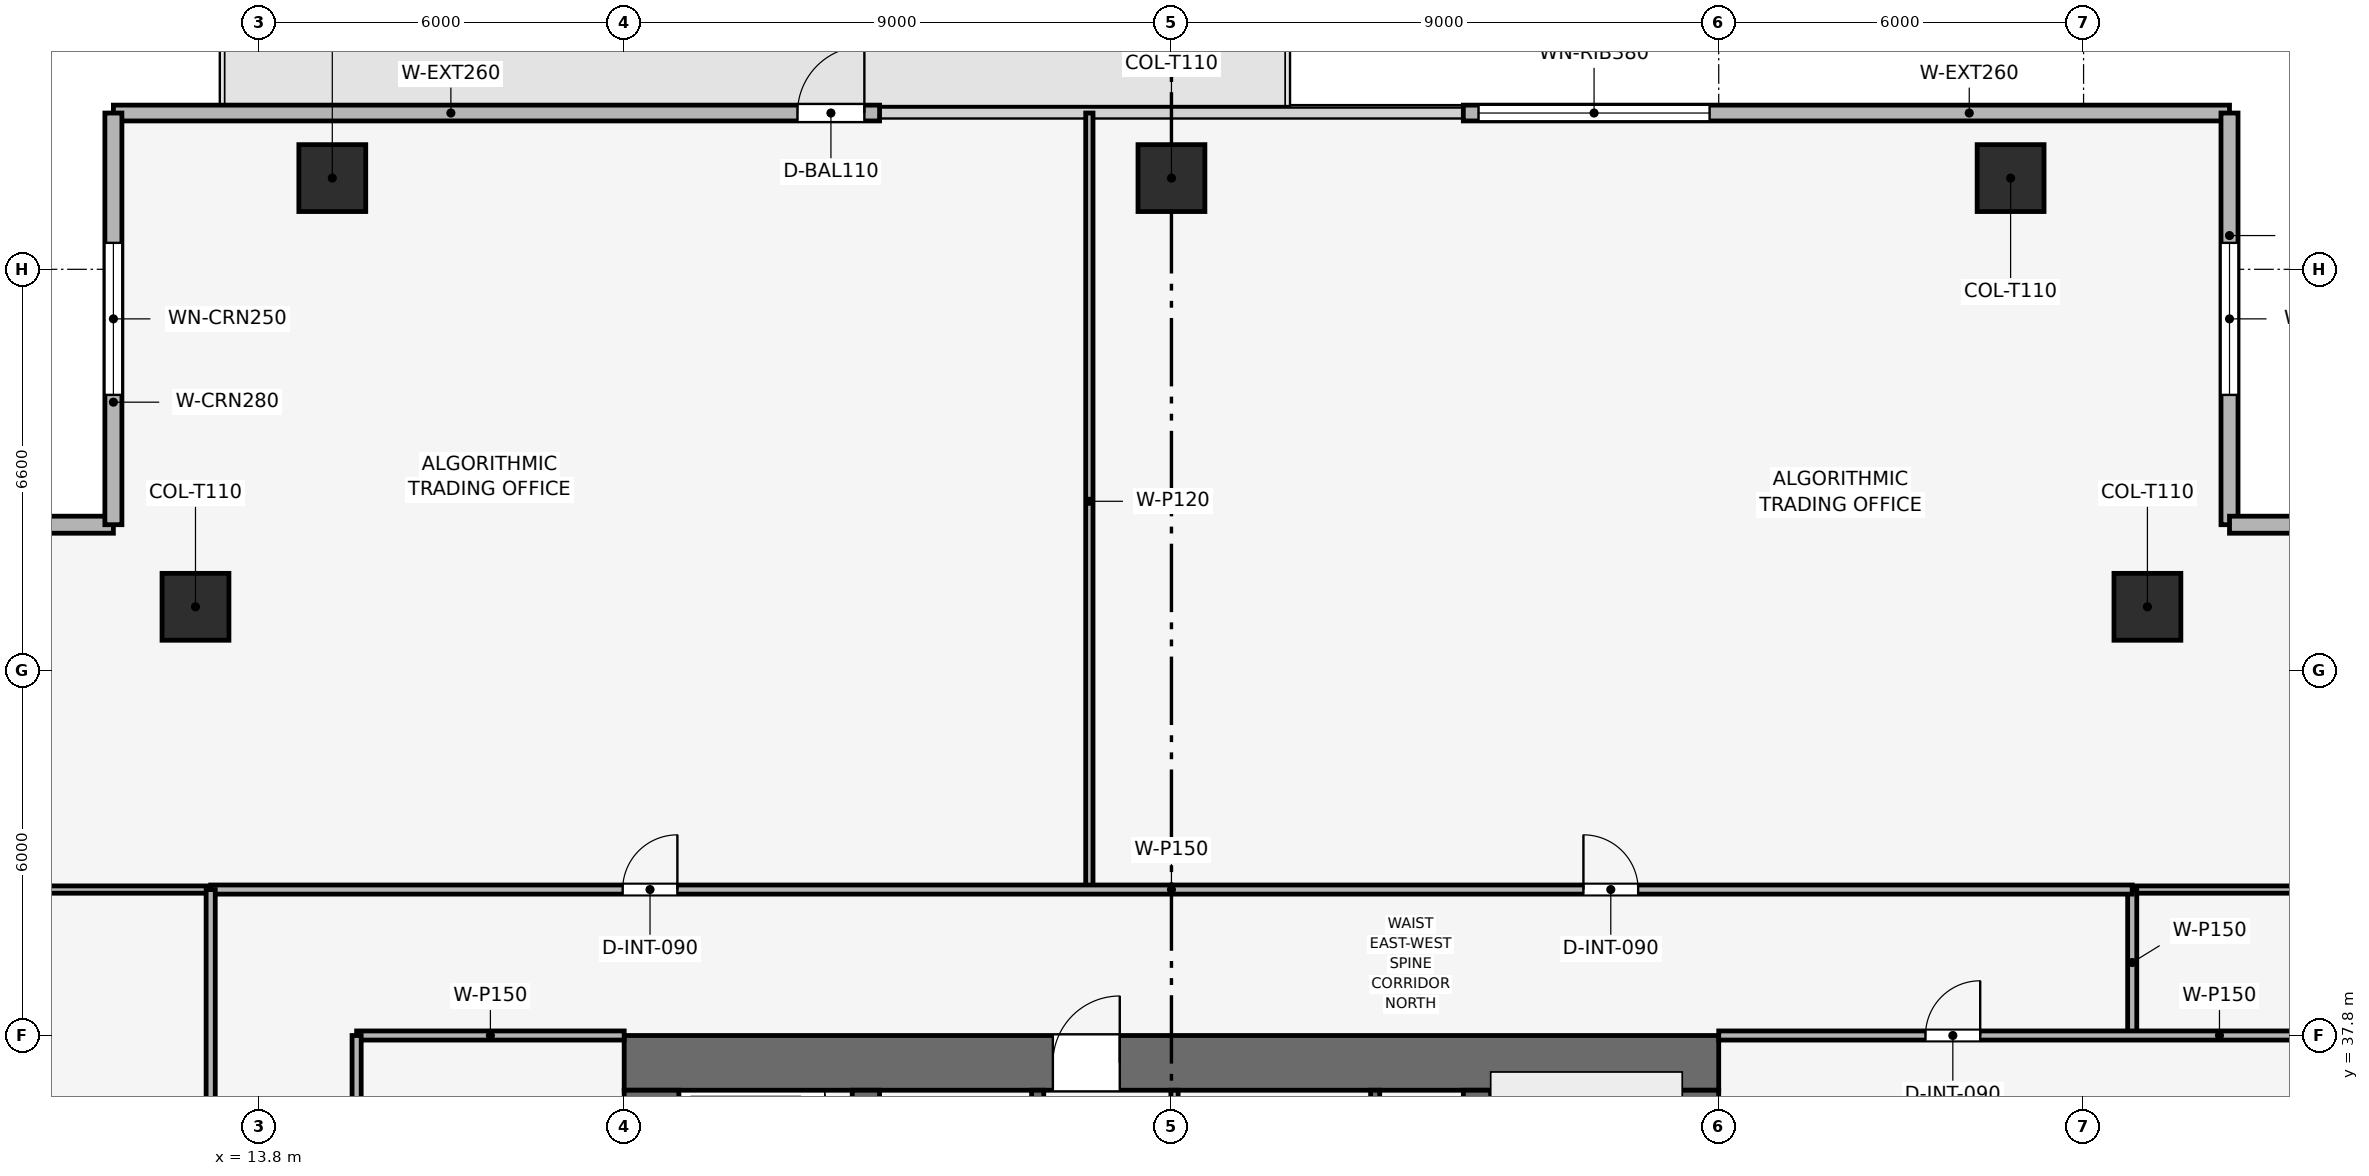
"""IFC4 building model, lengths in metres.
Left out: names, types, materials, properties, quantities, classifications, styles, units other than length and angle.
Written with IfcOpenShell. Run it as: python <this file> out.ifc"""

import sys

from ifc_helpers import new_model, si_unit, direction, frame, frame_2d, origin, origin_2d, place, context, subcontext, project, spatial, rectangle, extrude, element, fill, save


model = new_model("IFC4")
c1 = context("Model", 3, precision=1e-05, world=origin(), true_north=direction((0.0, 1.0)))
c2 = subcontext(c1, "Body", "Model", "MODEL_VIEW")
j1 = project(units=[si_unit("LENGTHUNIT", "METRE"), si_unit("PLANEANGLEUNIT", "RADIAN")], contexts=[c1])
p1 = place(None, origin())
s1 = spatial("IfcSite", under=j1, at=p1, CompositionType="ELEMENT")
p2 = place(p1, origin())
s2 = spatial("IfcBuilding", under=s1, at=p2, CompositionType="ELEMENT")
p3 = place(p2, frame((0.0, 0.0, 175.8)))
s3 = spatial("IfcBuildingStorey", under=s2, at=p3, CompositionType="ELEMENT", Elevation=175.8)
p4 = place(p3, frame((19.8, 37.35, 0.0), z_axis=(0.0, 0.0, 1.0), x_axis=(1.0, 0.0, 0.0)))
e1 = element("IfcWall", 1, at=p4, inside=s3, PredefinedType="SHEAR", context=c2, shape_type="SweptSolid", body=[
    extrude(rectangle(XDim=18.0, YDim=0.9, at=frame_2d((9.0, 0.0))), origin(), (0.0, 0.0, 1.0), 3.75),
])
p5 = place(p4, frame((7.05, 0.0, 0.0)))
e2 = element("IfcOpeningElement", 2, at=p5, cuts=e1, PredefinedType="OPENING", context=c2, shape_type="SweptSolid", body=[
    extrude(rectangle(XDim=1.1, YDim=2.15, at=frame_2d((0.55, 1.075))), frame((0.0, 0.46, 0.0), z_axis=(0.0, -1.0, 0.0), x_axis=(1.0, 0.0, 0.0)), (0.0, 0.0, 1.0), 0.92),
])
p6 = place(p3, frame((20.25, 20.7, 0.0), z_axis=(0.0, 0.0, 1.0), x_axis=(0.0, 1.0, 0.0)))
e3 = element("IfcWall", 3, at=p6, inside=s3, PredefinedType="SHEAR", context=c2, shape_type="SweptSolid", body=[
    extrude(rectangle(XDim=16.2, YDim=0.9, at=frame_2d((8.1, 0.0))), origin(), (0.0, 0.0, 1.0), 3.75),
])
p7 = place(p6, frame((10.1, 0.0, 0.0)))
e4 = element("IfcOpeningElement", 4, at=p7, cuts=e3, PredefinedType="OPENING", context=c2, shape_type="SweptSolid", body=[
    extrude(rectangle(XDim=1.1, YDim=2.15, at=frame_2d((0.55, 1.075))), frame((0.0, 0.46, 0.0), z_axis=(0.0, -1.0, 0.0), x_axis=(1.0, 0.0, 0.0)), (0.0, 0.0, 1.0), 0.92),
])
p8 = place(p3, frame((37.35, 20.7, 0.0), z_axis=(0.0, 0.0, 1.0), x_axis=(0.0, 1.0, 0.0)))
e5 = element("IfcWall", 5, at=p8, inside=s3, PredefinedType="SHEAR", context=c2, shape_type="SweptSolid", body=[
    extrude(rectangle(XDim=16.2, YDim=0.9, at=frame_2d((8.1, 0.0))), origin(), (0.0, 0.0, 1.0), 3.75),
])
p9 = place(p8, frame((4.6, 0.0, 0.0)))
e6 = element("IfcOpeningElement", 6, at=p9, cuts=e5, PredefinedType="OPENING", context=c2, shape_type="SweptSolid", body=[
    extrude(rectangle(XDim=1.1, YDim=2.15, at=frame_2d((0.55, 1.075))), frame((0.0, 0.46, 0.0), z_axis=(0.0, -1.0, 0.0), x_axis=(1.0, 0.0, 0.0)), (0.0, 0.0, 1.0), 0.92),
])
for number, where, z_axis, x_axis in (
    (7, (23.775, 20.7, 0.0), (0.0, 0.0, 1.0), (0.0, 1.0, 0.0)),
    (8, (33.825, 20.7, 0.0), (0.0, 0.0, 1.0), (0.0, 1.0, 0.0)),
):
    element("IfcWall", number, at=place(p3, frame(where, z_axis=z_axis, x_axis=x_axis)), inside=s3, PredefinedType="SHEAR", context=c2, shape_type="SweptSolid", body=[
        extrude(rectangle(XDim=16.2, YDim=0.45, at=frame_2d((8.1, 0.0))), origin(), (0.0, 0.0, 1.0), 3.75),
    ])
for number, where, z_axis, x_axis in (
    (9, (42.6, 51.9, 0.003), (0.0, 0.0, 1.0), (1.0, 0.0, 0.0)),
    (10, (28.8, 51.9, 0.003), (0.0, 0.0, 1.0), (1.0, 0.0, 0.0)),
    (11, (15.0, 51.9, 0.003), (0.0, 0.0, 1.0), (1.0, 0.0, 0.0)),
    (12, (44.85, 44.85, 0.003), (0.0, 0.0, 1.0), (1.0, 0.0, 0.0)),
    (13, (12.75, 44.85, 0.003), (0.0, 0.0, 1.0), (1.0, 0.0, 0.0)),
):
    element("IfcColumn", number, at=place(p3, frame(where, z_axis=z_axis, x_axis=x_axis)), inside=s3, PredefinedType="COLUMN", context=c2, shape_type="SweptSolid", body=[
        extrude(rectangle(XDim=1.1, YDim=1.1, at=origin_2d()), origin(), (0.0, 0.0, 1.0), 3.489),
    ])
p10 = place(p3, frame((11.4, 52.97, 0.0), z_axis=(0.0, 0.0, 1.0), x_axis=(1.0, 0.0, 0.0)))
e14 = element("IfcWall", 14, at=p10, inside=s3, PredefinedType="SOLIDWALL", context=c2, shape_type="SweptSolid", body=[
    extrude(rectangle(XDim=12.6, YDim=0.26, at=frame_2d((6.3, 0.0))), origin(), (0.0, 0.0, 1.0), 3.495),
])
p11 = place(p10, frame((11.25, 0.0, 0.0)))
e15 = element("IfcOpeningElement", 15, at=p11, cuts=e14, PredefinedType="OPENING", context=c2, shape_type="SweptSolid", body=[
    extrude(rectangle(XDim=1.1, YDim=2.2, at=frame_2d((0.55, 1.1))), frame((0.0, 0.14, 0.0), z_axis=(0.0, -1.0, 0.0), x_axis=(1.0, 0.0, 0.0)), (0.0, 0.0, 1.0), 0.28),
])
p12 = place(p3, frame((33.6, 52.97, 0.0), z_axis=(0.0, 0.0, 1.0), x_axis=(1.0, 0.0, 0.0)))
e16 = element("IfcWall", 16, at=p12, inside=s3, PredefinedType="SOLIDWALL", context=c2, shape_type="SweptSolid", body=[
    extrude(rectangle(XDim=12.6, YDim=0.26, at=frame_2d((6.3, 0.0))), origin(), (0.0, 0.0, 1.0), 3.495),
])
p13 = place(p12, frame((0.25, 0.0, 0.9)))
e17 = element("IfcOpeningElement", 17, at=p13, cuts=e16, PredefinedType="OPENING", context=c2, shape_type="SweptSolid", body=[
    extrude(rectangle(XDim=3.8, YDim=1.9, at=frame_2d((1.9, 0.95))), frame((0.0, 0.14, 0.0), z_axis=(0.0, -1.0, 0.0), x_axis=(1.0, 0.0, 0.0)), (0.0, 0.0, 1.0), 0.28),
])
p14 = place(p3, frame((4.63, 46.2, 0.0), z_axis=(0.0, 0.0, 1.0), x_axis=(1.0, 0.0, 0.0)))
e18 = element("IfcWall", 18, at=p14, inside=s3, PredefinedType="SOLIDWALL", context=c2, shape_type="SweptSolid", body=[
    extrude(rectangle(XDim=6.77, YDim=0.28, at=frame_2d((3.385, 0.0))), origin(), (0.0, 0.0, 1.0), 3.495),
])
p15 = place(p14, frame((2.135, 0.0, 0.9)))
e19 = element("IfcOpeningElement", 19, at=p15, cuts=e18, PredefinedType="OPENING", context=c2, shape_type="SweptSolid", body=[
    extrude(rectangle(XDim=2.5, YDim=1.9, at=frame_2d((1.25, 0.95))), frame((0.0, 0.15, 0.0), z_axis=(0.0, -1.0, 0.0), x_axis=(1.0, 0.0, 0.0)), (0.0, 0.0, 1.0), 0.3),
])
p16 = place(p3, frame((11.4, 46.2, 0.0), z_axis=(0.0, 0.0, 1.0), x_axis=(0.0, 1.0, 0.0)))
e20 = element("IfcWall", 20, at=p16, inside=s3, PredefinedType="SOLIDWALL", context=c2, shape_type="SweptSolid", body=[
    extrude(rectangle(XDim=6.77, YDim=0.28, at=frame_2d((3.385, 0.0))), origin(), (0.0, 0.0, 1.0), 3.495),
])
p17 = place(p16, frame((2.135, 0.0, 0.9)))
e21 = element("IfcOpeningElement", 21, at=p17, cuts=e20, PredefinedType="OPENING", context=c2, shape_type="SweptSolid", body=[
    extrude(rectangle(XDim=2.5, YDim=1.9, at=frame_2d((1.25, 0.95))), frame((0.0, 0.15, 0.0), z_axis=(0.0, -1.0, 0.0), x_axis=(1.0, 0.0, 0.0)), (0.0, 0.0, 1.0), 0.3),
])
p18 = place(p3, frame((46.2, 52.97, 0.0), z_axis=(0.0, 0.0, 1.0), x_axis=(0.0, -1.0, 0.0)))
e22 = element("IfcWall", 22, at=p18, inside=s3, PredefinedType="SOLIDWALL", context=c2, shape_type="SweptSolid", body=[
    extrude(rectangle(XDim=6.77, YDim=0.28, at=frame_2d((3.385, 0.0))), origin(), (0.0, 0.0, 1.0), 3.495),
])
p19 = place(p18, frame((2.135, 0.0, 0.9)))
e23 = element("IfcOpeningElement", 23, at=p19, cuts=e22, PredefinedType="OPENING", context=c2, shape_type="SweptSolid", body=[
    extrude(rectangle(XDim=2.5, YDim=1.9, at=frame_2d((1.25, 0.95))), frame((0.0, 0.15, 0.0), z_axis=(0.0, -1.0, 0.0), x_axis=(1.0, 0.0, 0.0)), (0.0, 0.0, 1.0), 0.3),
])
p20 = place(p3, frame((46.2, 46.2, 0.0), z_axis=(0.0, 0.0, 1.0), x_axis=(1.0, 0.0, 0.0)))
e24 = element("IfcWall", 24, at=p20, inside=s3, PredefinedType="SOLIDWALL", context=c2, shape_type="SweptSolid", body=[
    extrude(rectangle(XDim=6.77, YDim=0.28, at=frame_2d((3.385, 0.0))), origin(), (0.0, 0.0, 1.0), 3.495),
])
p21 = place(p20, frame((2.135, 0.0, 0.9)))
e25 = element("IfcOpeningElement", 25, at=p21, cuts=e24, PredefinedType="OPENING", context=c2, shape_type="SweptSolid", body=[
    extrude(rectangle(XDim=2.5, YDim=1.9, at=frame_2d((1.25, 0.95))), frame((0.0, 0.15, 0.0), z_axis=(0.0, -1.0, 0.0), x_axis=(1.0, 0.0, 0.0)), (0.0, 0.0, 1.0), 0.3),
])
p22 = place(p3, frame((32.15, 34.0, 0.0), z_axis=(0.0, 0.0, 1.0), x_axis=(0.0, 1.0, 0.0)))
e26 = element("IfcWall", 26, at=p22, inside=s3, PredefinedType="SHEAR", context=c2, shape_type="SweptSolid", body=[
    extrude(rectangle(XDim=2.9, YDim=0.15, at=frame_2d((1.45, 0.0))), origin(), (0.0, 0.0, 1.0), 3.495),
])
p23 = place(p3, frame((26.6, 34.0, 0.0), z_axis=(0.0, 0.0, 1.0), x_axis=(0.0, 1.0, 0.0)))
e27 = element("IfcWall", 27, at=p23, inside=s3, PredefinedType="SHEAR", context=c2, shape_type="SweptSolid", body=[
    extrude(rectangle(XDim=2.9, YDim=0.2, at=frame_2d((1.45, 0.0))), origin(), (0.0, 0.0, 1.0), 3.495),
])
p24 = place(p23, frame((0.75, 0.0, 0.0)))
e28 = element("IfcOpeningElement", 28, at=p24, cuts=e27, PredefinedType="OPENING", context=c2, shape_type="SweptSolid", body=[
    extrude(rectangle(XDim=1.1, YDim=2.15, at=frame_2d((0.55, 1.075))), frame((0.0, 0.11, 0.0), z_axis=(0.0, -1.0, 0.0), x_axis=(1.0, 0.0, 0.0)), (0.0, 0.0, 1.0), 0.22),
])
p25 = place(p3, frame((28.85, 33.925, 0.0), z_axis=(0.0, 0.0, 1.0), x_axis=(0.0, 1.0, 0.0)))
e29 = element("IfcWall", 29, at=p25, inside=s3, PredefinedType="PARTITIONING", context=c2, shape_type="SweptSolid", body=[
    extrude(rectangle(XDim=2.975, YDim=0.12, at=frame_2d((1.487, 0.0))), origin(), (0.0, 0.0, 1.0), 3.495),
])
p26 = place(p25, frame((0.25, 0.0, 0.0)))
e30 = element("IfcOpeningElement", 30, at=p26, cuts=e29, PredefinedType="OPENING", context=c2, shape_type="SweptSolid", body=[
    extrude(rectangle(XDim=0.85, YDim=2.1, at=frame_2d((0.425, 1.05))), frame((0.0, 0.07, 0.0), z_axis=(0.0, -1.0, 0.0), x_axis=(1.0, 0.0, 0.0)), (0.0, 0.0, 1.0), 0.14),
])
p27 = place(p25, frame((1.645, 0.0, 0.0)))
e31 = element("IfcOpeningElement", 31, at=p27, cuts=e29, PredefinedType="OPENING", context=c2, shape_type="SweptSolid", body=[
    extrude(rectangle(XDim=0.85, YDim=2.1, at=frame_2d((0.425, 1.05))), frame((0.0, 0.07, 0.0), z_axis=(0.0, -1.0, 0.0), x_axis=(1.0, 0.0, 0.0)), (0.0, 0.0, 1.0), 0.14),
])
p28 = place(p3, frame((15.4, 37.8, 0.0), z_axis=(0.0, 0.0, 1.0), x_axis=(1.0, 0.0, 0.0)))
e32 = element("IfcWall", 32, at=p28, inside=s3, PredefinedType="PARTITIONING", context=c2, shape_type="SweptSolid", body=[
    extrude(rectangle(XDim=4.4, YDim=0.15, at=frame_2d((2.2, 0.0))), origin(), (0.0, 0.0, 1.0), 3.03),
])
p29 = place(p3, frame((15.4, 32.45, 0.0), z_axis=(0.0, 0.0, 1.0), x_axis=(0.0, 1.0, 0.0)))
e33 = element("IfcWall", 33, at=p29, inside=s3, PredefinedType="PARTITIONING", context=c2, shape_type="SweptSolid", body=[
    extrude(rectangle(XDim=5.35, YDim=0.15, at=frame_2d((2.675, 0.0))), origin(), (0.0, 0.0, 1.0), 3.03),
])
p30 = place(p29, frame((2.1, 0.0, 0.0)))
e34 = element("IfcOpeningElement", 34, at=p30, cuts=e33, PredefinedType="OPENING", context=c2, shape_type="SweptSolid", body=[
    extrude(rectangle(XDim=0.9, YDim=2.1, at=frame_2d((0.45, 1.05))), frame((0.0, 0.085, 0.0), z_axis=(0.0, -1.0, 0.0), x_axis=(1.0, 0.0, 0.0)), (0.0, 0.0, 1.0), 0.17),
])
p31 = place(p3, frame((27.45, 40.2, 0.0), z_axis=(0.0, 0.0, 1.0), x_axis=(0.0, 1.0, 0.0)))
e35 = element("IfcWall", 35, at=p31, inside=s3, PredefinedType="PARTITIONING", context=c2, shape_type="SweptSolid", body=[
    extrude(rectangle(XDim=12.77, YDim=0.12, at=frame_2d((6.385, 0.0))), origin(), (0.0, 0.0, 1.0), 2.98),
])
p32 = place(p3, frame((4.63, 40.2, 0.0), z_axis=(0.0, 0.0, 1.0), x_axis=(1.0, 0.0, 0.0)))
e36 = element("IfcWall", 36, at=p32, inside=s3, PredefinedType="PARTITIONING", context=c2, shape_type="SweptSolid", body=[
    extrude(rectangle(XDim=8.37, YDim=0.12, at=frame_2d((4.185, 0.0))), origin(), (0.0, 0.0, 1.0), 2.98),
])
p33 = place(p3, frame((44.6, 40.2, 0.0), z_axis=(0.0, 0.0, 1.0), x_axis=(1.0, 0.0, 0.0)))
e37 = element("IfcWall", 37, at=p33, inside=s3, PredefinedType="PARTITIONING", context=c2, shape_type="SweptSolid", body=[
    extrude(rectangle(XDim=8.37, YDim=0.12, at=frame_2d((4.185, 0.0))), origin(), (0.0, 0.0, 1.0), 2.98),
])
p34 = place(p3, frame((44.6, 37.8, 0.0), z_axis=(0.0, 0.0, 1.0), x_axis=(0.0, 1.0, 0.0)))
e38 = element("IfcWall", 38, at=p34, inside=s3, PredefinedType="PARTITIONING", context=c2, shape_type="SweptSolid", body=[
    extrude(rectangle(XDim=2.4, YDim=0.15, at=frame_2d((1.2, 0.0))), origin(), (0.0, 0.0, 1.0), 3.495),
])
p35 = place(p3, frame((37.8, 37.8, 0.0), z_axis=(0.0, 0.0, 1.0), x_axis=(1.0, 0.0, 0.0)))
e39 = element("IfcWall", 39, at=p35, inside=s3, PredefinedType="PARTITIONING", context=c2, shape_type="SweptSolid", body=[
    extrude(rectangle(XDim=15.17, YDim=0.15, at=frame_2d((7.585, 0.0))), origin(), (0.0, 0.0, 1.0), 2.98),
])
p36 = place(p35, frame((3.4, 0.0, 0.0)))
e40 = element("IfcOpeningElement", 40, at=p36, cuts=e39, PredefinedType="OPENING", context=c2, shape_type="SweptSolid", body=[
    extrude(rectangle(XDim=0.9, YDim=2.1, at=frame_2d((0.45, 1.05))), frame((0.0, 0.085, 0.0), z_axis=(0.0, -1.0, 0.0), x_axis=(1.0, 0.0, 0.0)), (0.0, 0.0, 1.0), 0.17),
])
p37 = place(p3, frame((13.0, 40.2, 0.0), z_axis=(0.0, 0.0, 1.0), x_axis=(1.0, 0.0, 0.0)))
e41 = element("IfcWall", 41, at=p37, inside=s3, PredefinedType="PARTITIONING", context=c2, shape_type="SweptSolid", body=[
    extrude(rectangle(XDim=31.6, YDim=0.15, at=frame_2d((15.8, 0.0))), origin(), (0.0, 0.0, 1.0), 3.03),
])
p38 = place(p37, frame((6.775, 0.0, 0.0)))
e42 = element("IfcOpeningElement", 42, at=p38, cuts=e41, PredefinedType="OPENING", context=c2, shape_type="SweptSolid", body=[
    extrude(rectangle(XDim=0.9, YDim=2.1, at=frame_2d((0.45, 1.05))), frame((0.0, 0.085, 0.0), z_axis=(0.0, -1.0, 0.0), x_axis=(1.0, 0.0, 0.0)), (0.0, 0.0, 1.0), 0.17),
])
p39 = place(p37, frame((22.575, 0.0, 0.0)))
e43 = element("IfcOpeningElement", 43, at=p39, cuts=e41, PredefinedType="OPENING", context=c2, shape_type="SweptSolid", body=[
    extrude(rectangle(XDim=0.9, YDim=2.1, at=frame_2d((0.45, 1.05))), frame((0.0, 0.085, 0.0), z_axis=(0.0, -1.0, 0.0), x_axis=(1.0, 0.0, 0.0)), (0.0, 0.0, 1.0), 0.17),
])
p40 = place(p3, frame((13.0, 17.4, 0.0), z_axis=(0.0, 0.0, 1.0), x_axis=(0.0, 1.0, 0.0)))
e44 = element("IfcWall", 44, at=p40, inside=s3, PredefinedType="PARTITIONING", context=c2, shape_type="SweptSolid", body=[
    extrude(rectangle(XDim=22.8, YDim=0.15, at=frame_2d((11.4, 0.0))), origin(), (0.0, 0.0, 1.0), 3.03),
])
p41 = place(p40, frame((10.95, 0.0, 0.0)))
e45 = element("IfcOpeningElement", 45, at=p41, cuts=e44, PredefinedType="OPENING", context=c2, shape_type="SweptSolid", body=[
    extrude(rectangle(XDim=0.9, YDim=2.1, at=frame_2d((0.45, 1.05))), frame((0.0, 0.085, 0.0), z_axis=(0.0, -1.0, 0.0), x_axis=(1.0, 0.0, 0.0)), (0.0, 0.0, 1.0), 0.17),
])
p42 = place(p11, origin())
e46 = element("IfcDoor", 46, at=p42, inside=s3, OperationType="SINGLE_SWING_RIGHT", PredefinedType="DOOR", context=c2, shape_type="SweptSolid", body=[
    extrude(rectangle(XDim=1.1, YDim=2.2, at=frame_2d((0.55, 1.1))), frame((0.0, 0.025, 0.0), z_axis=(0.0, -1.0, 0.0), x_axis=(1.0, 0.0, 0.0)), (0.0, 0.0, 1.0), 0.05),
])
fill(e15, e46)
p43 = place(p13, origin())
e47 = element("IfcWindow", 47, at=p43, inside=s3, PartitioningType="SINGLE_PANEL", PredefinedType="WINDOW", context=c2, shape_type="SweptSolid", body=[
    extrude(rectangle(XDim=3.8, YDim=1.9, at=frame_2d((1.9, 0.95))), frame((0.0, 0.03, 0.0), z_axis=(0.0, -1.0, 0.0), x_axis=(1.0, 0.0, 0.0)), (0.0, 0.0, 1.0), 0.06),
])
fill(e17, e47)
p44 = place(p17, origin())
e48 = element("IfcWindow", 48, at=p44, inside=s3, PartitioningType="SINGLE_PANEL", PredefinedType="WINDOW", context=c2, shape_type="SweptSolid", body=[
    extrude(rectangle(XDim=2.5, YDim=1.9, at=frame_2d((1.25, 0.95))), frame((0.0, 0.03, 0.0), z_axis=(0.0, -1.0, 0.0), x_axis=(1.0, 0.0, 0.0)), (0.0, 0.0, 1.0), 0.06),
])
fill(e21, e48)
p45 = place(p19, origin())
e49 = element("IfcWindow", 49, at=p45, inside=s3, PartitioningType="SINGLE_PANEL", PredefinedType="WINDOW", context=c2, shape_type="SweptSolid", body=[
    extrude(rectangle(XDim=2.5, YDim=1.9, at=frame_2d((1.25, 0.95))), frame((0.0, 0.03, 0.0), z_axis=(0.0, -1.0, 0.0), x_axis=(1.0, 0.0, 0.0)), (0.0, 0.0, 1.0), 0.06),
])
fill(e23, e49)
p46 = place(p36, origin())
e50 = element("IfcDoor", 50, at=p46, inside=s3, OperationType="SINGLE_SWING_RIGHT", PredefinedType="DOOR", context=c2, shape_type="SweptSolid", body=[
    extrude(rectangle(XDim=0.9, YDim=2.1, at=frame_2d((0.45, 1.05))), frame((0.0, 0.025, 0.0), z_axis=(0.0, -1.0, 0.0), x_axis=(1.0, 0.0, 0.0)), (0.0, 0.0, 1.0), 0.05),
])
fill(e40, e50)
p47 = place(p38, origin())
e51 = element("IfcDoor", 51, at=p47, inside=s3, OperationType="SINGLE_SWING_RIGHT", PredefinedType="DOOR", context=c2, shape_type="SweptSolid", body=[
    extrude(rectangle(XDim=0.9, YDim=2.1, at=frame_2d((0.45, 1.05))), frame((0.0, 0.025, 0.0), z_axis=(0.0, -1.0, 0.0), x_axis=(1.0, 0.0, 0.0)), (0.0, 0.0, 1.0), 0.05),
])
fill(e42, e51)
p48 = place(p39, origin())
e52 = element("IfcDoor", 52, at=p48, inside=s3, OperationType="SINGLE_SWING_LEFT", PredefinedType="DOOR", context=c2, shape_type="SweptSolid", body=[
    extrude(rectangle(XDim=0.9, YDim=2.1, at=frame_2d((0.45, 1.05))), frame((0.0, 0.025, 0.0), z_axis=(0.0, -1.0, 0.0), x_axis=(1.0, 0.0, 0.0)), (0.0, 0.0, 1.0), 0.05),
])
fill(e43, e52)
p49 = place(p5, origin())
e53 = element("IfcDoor", 53, at=p49, inside=s3, OperationType="SINGLE_SWING_RIGHT", PredefinedType="DOOR", context=c2, shape_type="SweptSolid", body=[
    extrude(rectangle(XDim=1.1, YDim=2.15, at=frame_2d((0.55, 1.075))), frame((0.0, 0.025, 0.0), z_axis=(0.0, -1.0, 0.0), x_axis=(1.0, 0.0, 0.0)), (0.0, 0.0, 1.0), 0.05),
])
fill(e2, e53)
save(model, sys.argv[1])
